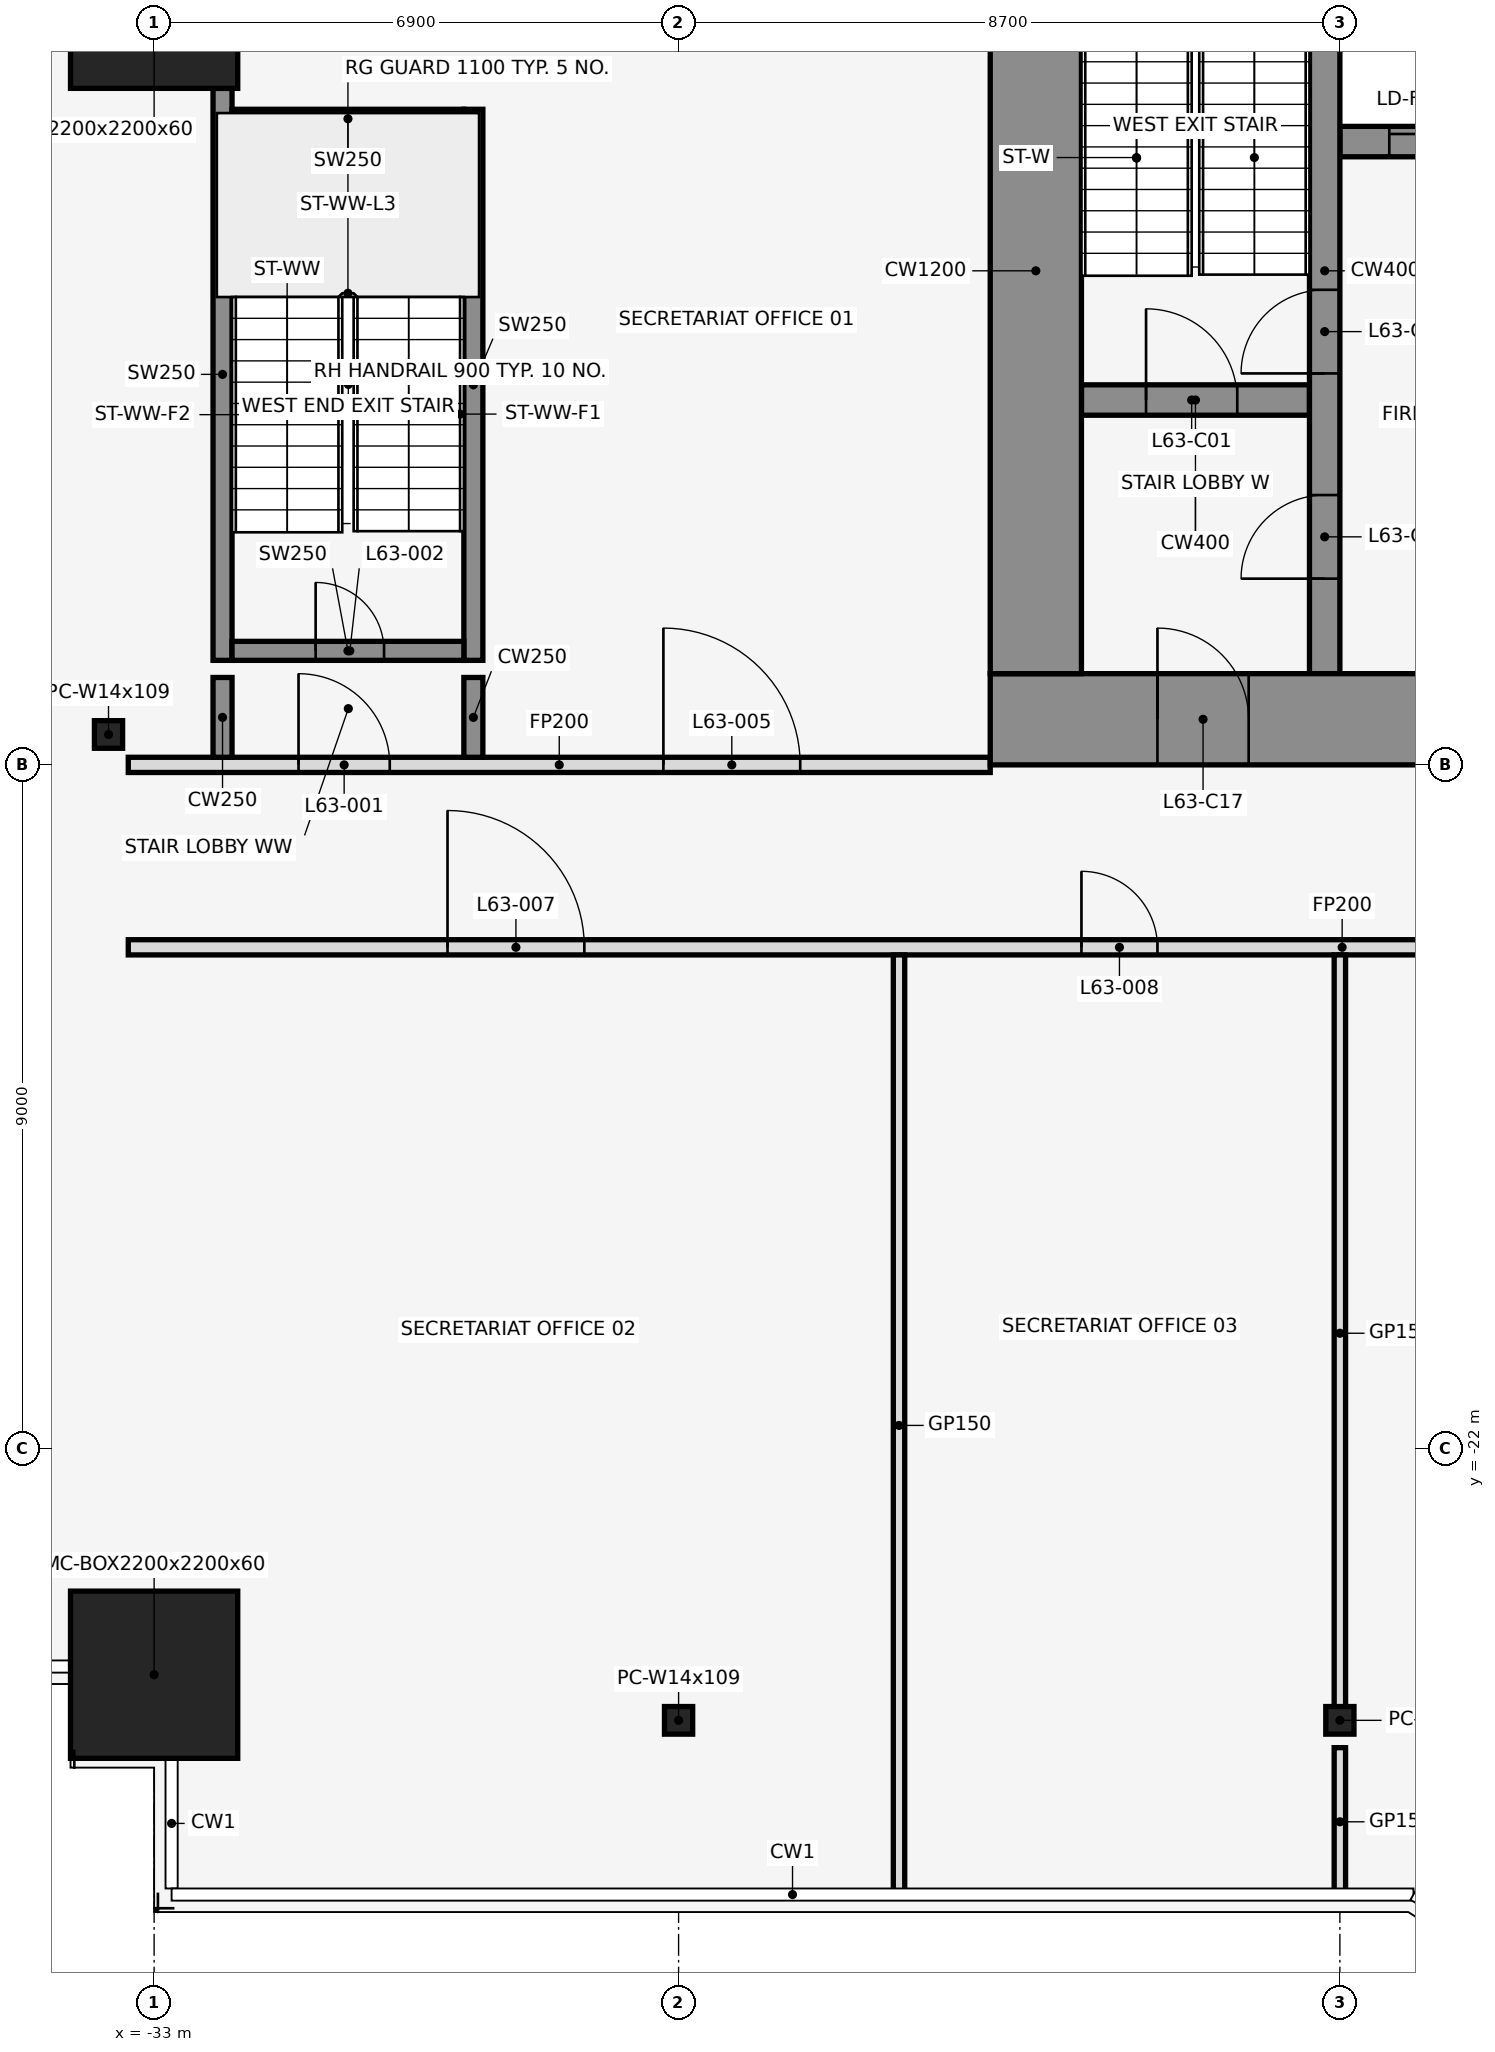
"""IFC4 building model, lengths in metres.
Left out: names, types, materials, properties, quantities, classifications, styles, units other than length and angle.
Written with IfcOpenShell. Run it as: python <this file> out.ifc"""

import sys

from ifc_helpers import new_model, si_unit, direction, frame, frame_2d, origin, origin_2d, place, context, subcontext, project, spatial, rectangle, hollow_rectangle, i_section, extrude, element, fill, save


model = new_model("IFC4")
c1 = context("Model", 3, precision=1e-05, world=origin(), true_north=direction((0.0, 1.0)))
c2 = subcontext(c1, "Body", "Model", "MODEL_VIEW")
j1 = project(units=[si_unit("LENGTHUNIT", "METRE"), si_unit("PLANEANGLEUNIT", "RADIAN")], contexts=[c1])
p1 = place(None, origin())
s1 = spatial("IfcSite", under=j1, at=p1, CompositionType="ELEMENT")
p2 = place(p1, origin())
s2 = spatial("IfcBuilding", under=s1, at=p2, CompositionType="ELEMENT")
p3 = place(p2, frame((0.0, 0.0, 279.2)))
s3 = spatial("IfcBuildingStorey", under=s2, at=p3, CompositionType="ELEMENT", Elevation=279.2)
for number, where, z_axis, x_axis in (
    (1, (-33.0, -24.97, 0.0), (0.0, 0.0, 1.0), (1.0, 0.0, 0.0)),
    (2, (-33.0, -3.0, 0.0), (0.0, 0.0, 1.0), (1.0, 0.0, 0.0)),
):
    element("IfcColumn", number, at=place(p3, frame(where, z_axis=z_axis, x_axis=x_axis)), inside=s3, PredefinedType="COLUMN", context=c2, shape_type="SweptSolid", body=[
        extrude(hollow_rectangle(XDim=2.2, YDim=2.2, WallThickness=0.06, at=origin_2d()), origin(), (0.0, 0.0, 1.0), 4.2),
    ])
for number, where, z_axis, x_axis in (
    (3, (-26.1, -25.57, 0.0), (0.0, 0.0, 1.0), (1.0, 0.0, 0.0)),
    (4, (-17.4, -25.57, 0.0), (0.0, 0.0, 1.0), (1.0, 0.0, 0.0)),
    (5, (-33.6, -12.6, 0.0), (0.0, 0.0, 1.0), (1.0, 0.0, 0.0)),
):
    element("IfcColumn", number, at=place(p3, frame(where, z_axis=z_axis, x_axis=x_axis)), inside=s3, PredefinedType="COLUMN", context=c2, shape_type="SweptSolid", body=[
        extrude(i_section(OverallWidth=0.371, OverallDepth=0.363, WebThickness=0.013, FlangeThickness=0.022, at=origin_2d()), origin(), (0.0, 0.0, 1.0), 4.2),
    ])
p4 = place(p3, frame((-32.1, -11.625, 0.0), z_axis=(0.0, 0.0, 1.0), x_axis=(0.0, 1.0, 0.0)))
e6 = element("IfcWall", 6, at=p4, inside=s3, PredefinedType="SHEAR", context=c2, shape_type="SweptSolid", body=[
    extrude(rectangle(XDim=7.525, YDim=0.25, at=frame_2d((3.762, 0.0))), origin(), (0.0, 0.0, 1.0), 4.2),
])
p5 = place(p3, frame((-28.8, -11.625, 0.0), z_axis=(0.0, 0.0, 1.0), x_axis=(0.0, 1.0, 0.0)))
e7 = element("IfcWall", 7, at=p5, inside=s3, PredefinedType="SHEAR", context=c2, shape_type="SweptSolid", body=[
    extrude(rectangle(XDim=7.25, YDim=0.25, at=frame_2d((3.625, 0.0))), origin(), (0.0, 0.0, 1.0), 4.2),
])
p6 = place(p3, frame((-31.975, -11.5, 0.0), z_axis=(0.0, 0.0, 1.0), x_axis=(1.0, 0.0, 0.0)))
e8 = element("IfcWall", 8, at=p6, inside=s3, PredefinedType="SHEAR", context=c2, shape_type="SweptSolid", body=[
    extrude(rectangle(XDim=3.05, YDim=0.25, at=frame_2d((1.525, 0.0))), origin(), (0.0, 0.0, 1.0), 4.2),
])
p7 = place(p6, frame((1.1, 0.0, 0.0)))
e9 = element("IfcOpeningElement", 9, at=p7, cuts=e8, PredefinedType="OPENING", context=c2, shape_type="SweptSolid", body=[
    extrude(rectangle(XDim=0.9, YDim=2.1, at=frame_2d((0.45, 1.05))), frame((0.0, 0.137, 0.0), z_axis=(0.0, -1.0, 0.0), x_axis=(1.0, 0.0, 0.0)), (0.0, 0.0, 1.0), 0.274),
])
p8 = place(p3, frame((-31.975, -4.5, 0.0), z_axis=(0.0, 0.0, 1.0), x_axis=(1.0, 0.0, 0.0)))
e10 = element("IfcWall", 10, at=p8, inside=s3, PredefinedType="SHEAR", context=c2, shape_type="SweptSolid", body=[
    extrude(rectangle(XDim=3.05, YDim=0.25, at=frame_2d((1.525, 0.0))), origin(), (0.0, 0.0, 1.0), 4.2),
])
p9 = place(p3, frame((-33.34, -15.4, 0.0), z_axis=(0.0, 0.0, 1.0), x_axis=(1.0, 0.0, 0.0)))
e11 = element("IfcWall", 11, at=p9, inside=s3, PredefinedType="PARTITIONING", context=c2, shape_type="SweptSolid", body=[
    extrude(rectangle(XDim=31.94, YDim=0.2, at=frame_2d((15.97, 0.0))), origin(), (0.0, 0.0, 1.0), 3.04),
])
p10 = place(p9, frame((4.2, 0.0, 0.0)))
e12 = element("IfcOpeningElement", 12, at=p10, cuts=e11, PredefinedType="OPENING", context=c2, shape_type="SweptSolid", body=[
    extrude(rectangle(XDim=1.8, YDim=2.1, at=frame_2d((0.9, 1.05))), frame((0.0, 0.112, 0.0), z_axis=(0.0, -1.0, 0.0), x_axis=(1.0, 0.0, 0.0)), (0.0, 0.0, 1.0), 0.224),
])
p11 = place(p9, frame((12.54, 0.0, 0.0)))
e13 = element("IfcOpeningElement", 13, at=p11, cuts=e11, PredefinedType="OPENING", context=c2, shape_type="SweptSolid", body=[
    extrude(rectangle(XDim=1.0, YDim=2.1, at=frame_2d((0.5, 1.05))), frame((0.0, 0.112, 0.0), z_axis=(0.0, -1.0, 0.0), x_axis=(1.0, 0.0, 0.0)), (0.0, 0.0, 1.0), 0.224),
])
p12 = place(p9, frame((20.84, 0.0, 0.0)))
e14 = element("IfcOpeningElement", 14, at=p12, cuts=e11, PredefinedType="OPENING", context=c2, shape_type="SweptSolid", body=[
    extrude(rectangle(XDim=1.8, YDim=2.1, at=frame_2d((0.9, 1.05))), frame((0.0, 0.112, 0.0), z_axis=(0.0, -1.0, 0.0), x_axis=(1.0, 0.0, 0.0)), (0.0, 0.0, 1.0), 0.224),
])
p13 = place(p3, frame((-33.34, -13.0, 0.0), z_axis=(0.0, 0.0, 1.0), x_axis=(1.0, 0.0, 0.0)))
e15 = element("IfcWall", 15, at=p13, inside=s3, PredefinedType="PARTITIONING", context=c2, shape_type="SweptSolid", body=[
    extrude(rectangle(XDim=11.34, YDim=0.2, at=frame_2d((5.67, 0.0))), origin(), (0.0, 0.0, 1.0), 3.04),
])
p14 = place(p13, frame((2.24, 0.0, 0.0)))
e16 = element("IfcOpeningElement", 16, at=p14, cuts=e15, PredefinedType="OPENING", context=c2, shape_type="SweptSolid", body=[
    extrude(rectangle(XDim=1.2, YDim=2.1, at=frame_2d((0.6, 1.05))), frame((0.0, 0.112, 0.0), z_axis=(0.0, -1.0, 0.0), x_axis=(1.0, 0.0, 0.0)), (0.0, 0.0, 1.0), 0.224),
])
p15 = place(p13, frame((7.04, 0.0, 0.0)))
e17 = element("IfcOpeningElement", 17, at=p15, cuts=e15, PredefinedType="OPENING", context=c2, shape_type="SweptSolid", body=[
    extrude(rectangle(XDim=1.8, YDim=2.1, at=frame_2d((0.9, 1.05))), frame((0.0, 0.112, 0.0), z_axis=(0.0, -1.0, 0.0), x_axis=(1.0, 0.0, 0.0)), (0.0, 0.0, 1.0), 0.224),
])
for number, where, z_axis, x_axis in (
    (18, (-32.1, -12.9, 0.0), (0.0, 0.0, 1.0), (0.0, 1.0, 0.0)),
    (19, (-28.8, -12.9, 0.0), (0.0, 0.0, 1.0), (0.0, 1.0, 0.0)),
):
    element("IfcWall", number, at=place(p3, frame(where, z_axis=z_axis, x_axis=x_axis)), inside=s3, PredefinedType="SHEAR", context=c2, shape_type="SweptSolid", body=[
        extrude(rectangle(XDim=1.05, YDim=0.25, at=frame_2d((0.525, 0.0))), origin(), (0.0, 0.0, 1.0), 4.2),
    ])
p16 = place(p3, frame((-23.2, -27.88, 0.0), z_axis=(0.0, 0.0, 1.0), x_axis=(0.0, 1.0, 0.0)))
e20 = element("IfcWall", 20, at=p16, inside=s3, PredefinedType="PARTITIONING", context=c2, shape_type="SweptSolid", body=[
    extrude(rectangle(XDim=12.38, YDim=0.15, at=frame_2d((6.19, 0.0))), origin(), (0.0, 0.0, 1.0), 3.04),
])
p17 = place(p3, frame((-17.4, -27.88, 0.0), z_axis=(0.0, 0.0, 1.0), x_axis=(0.0, 1.0, 0.0)))
e21 = element("IfcWall", 21, at=p17, inside=s3, PredefinedType="PARTITIONING", context=c2, shape_type="SweptSolid", body=[
    extrude(rectangle(XDim=1.951, YDim=0.15, at=frame_2d((0.975, 0.0))), origin(), (0.0, 0.0, 1.0), 3.04),
])
p18 = place(p3, frame((-17.4, -25.455, 0.0), z_axis=(0.0, 0.0, 1.0), x_axis=(0.0, 1.0, 0.0)))
e22 = element("IfcWall", 22, at=p18, inside=s3, PredefinedType="PARTITIONING", context=c2, shape_type="SweptSolid", body=[
    extrude(rectangle(XDim=9.955, YDim=0.15, at=frame_2d((4.977, 0.0))), origin(), (0.0, 0.0, 1.0), 3.04),
])
p19 = place(p3, frame((-20.8, -8.2, 0.0), z_axis=(0.0, 0.0, 1.0), x_axis=(1.0, 0.0, 0.0)))
e23 = element("IfcWall", 23, at=p19, inside=s3, PredefinedType="SHEAR", context=c2, shape_type="SweptSolid", body=[
    extrude(rectangle(XDim=3.0, YDim=0.4, at=frame_2d((1.5, 0.0))), origin(), (0.0, 0.0, 1.0), 4.2),
])
p20 = place(p19, frame((0.85, 0.0, 0.0)))
e24 = element("IfcOpeningElement", 24, at=p20, cuts=e23, PredefinedType="OPENING", context=c2, shape_type="SweptSolid", body=[
    extrude(rectangle(XDim=1.2, YDim=2.1, at=frame_2d((0.6, 1.05))), frame((0.0, 0.212, 0.0), z_axis=(0.0, -1.0, 0.0), x_axis=(1.0, 0.0, 0.0)), (0.0, 0.0, 1.0), 0.424),
])
p21 = place(p3, frame((-17.4, -4.8, 0.0), z_axis=(0.0, 0.0, 1.0), x_axis=(1.0, 0.0, 0.0)))
e25 = element("IfcWall", 25, at=p21, inside=s3, PredefinedType="SHEAR", context=c2, shape_type="SweptSolid", body=[
    extrude(rectangle(XDim=13.6, YDim=0.4, at=frame_2d((6.8, 0.0))), origin(), (0.0, 0.0, 1.0), 4.2),
])
p22 = place(p21, frame((0.65, 0.0, 0.0)))
e26 = element("IfcOpeningElement", 26, at=p22, cuts=e25, PredefinedType="OPENING", context=c2, shape_type="SweptSolid", body=[
    extrude(rectangle(XDim=1.1, YDim=2.1, at=frame_2d((0.55, 1.05))), frame((0.0, 0.212, 0.0), z_axis=(0.0, -1.0, 0.0), x_axis=(1.0, 0.0, 0.0)), (0.0, 0.0, 1.0), 0.424),
])
p23 = place(p21, frame((2.95, 0.0, 0.0)))
e27 = element("IfcOpeningElement", 27, at=p23, cuts=e25, PredefinedType="OPENING", context=c2, shape_type="SweptSolid", body=[
    extrude(rectangle(XDim=1.1, YDim=2.1, at=frame_2d((0.55, 1.05))), frame((0.0, 0.212, 0.0), z_axis=(0.0, -1.0, 0.0), x_axis=(1.0, 0.0, 0.0)), (0.0, 0.0, 1.0), 0.424),
])
p24 = place(p21, frame((8.75, 0.0, 0.0)))
e28 = element("IfcOpeningElement", 28, at=p24, cuts=e25, PredefinedType="OPENING", context=c2, shape_type="SweptSolid", body=[
    extrude(rectangle(XDim=0.9, YDim=2.1, at=frame_2d((0.45, 1.05))), frame((0.0, 0.212, 0.0), z_axis=(0.0, -1.0, 0.0), x_axis=(1.0, 0.0, 0.0)), (0.0, 0.0, 1.0), 0.424),
])
p25 = place(p3, frame((-17.6, -11.8, 0.0), z_axis=(0.0, 0.0, 1.0), x_axis=(0.0, 1.0, 0.0)))
e29 = element("IfcWall", 29, at=p25, inside=s3, PredefinedType="SHEAR", context=c2, shape_type="SweptSolid", body=[
    extrude(rectangle(XDim=10.6, YDim=0.4, at=frame_2d((5.3, 0.0))), origin(), (0.0, 0.0, 1.0), 4.2),
])
p26 = place(p25, frame((1.25, 0.0, 0.0)))
e30 = element("IfcOpeningElement", 30, at=p26, cuts=e29, PredefinedType="OPENING", context=c2, shape_type="SweptSolid", body=[
    extrude(rectangle(XDim=1.1, YDim=2.1, at=frame_2d((0.55, 1.05))), frame((0.0, 0.212, 0.0), z_axis=(0.0, -1.0, 0.0), x_axis=(1.0, 0.0, 0.0)), (0.0, 0.0, 1.0), 0.424),
])
p27 = place(p25, frame((3.95, 0.0, 0.0)))
e31 = element("IfcOpeningElement", 31, at=p27, cuts=e29, PredefinedType="OPENING", context=c2, shape_type="SweptSolid", body=[
    extrude(rectangle(XDim=1.1, YDim=2.1, at=frame_2d((0.55, 1.05))), frame((0.0, 0.212, 0.0), z_axis=(0.0, -1.0, 0.0), x_axis=(1.0, 0.0, 0.0)), (0.0, 0.0, 1.0), 0.424),
])
p28 = place(p3, frame((-22.0, -12.4, 0.0), z_axis=(0.0, 0.0, 1.0), x_axis=(1.0, 0.0, 0.0)))
e32 = element("IfcWall", 32, at=p28, inside=s3, PredefinedType="SHEAR", context=c2, shape_type="SweptSolid", body=[
    extrude(rectangle(XDim=44.0, YDim=1.2, at=frame_2d((22.0, 0.0))), origin(), (0.0, 0.0, 1.0), 4.2),
])
p29 = place(p28, frame((2.2, 0.0, 0.0)))
e33 = element("IfcOpeningElement", 33, at=p29, cuts=e32, PredefinedType="OPENING", context=c2, shape_type="SweptSolid", body=[
    extrude(rectangle(XDim=1.2, YDim=2.1, at=frame_2d((0.6, 1.05))), frame((0.0, 0.612, 0.0), z_axis=(0.0, -1.0, 0.0), x_axis=(1.0, 0.0, 0.0)), (0.0, 0.0, 1.0), 1.224),
])
p30 = place(p28, frame((21.4, 0.0, 0.0)))
e34 = element("IfcOpeningElement", 34, at=p30, cuts=e32, PredefinedType="OPENING", context=c2, shape_type="SweptSolid", body=[
    extrude(rectangle(XDim=1.2, YDim=2.1, at=frame_2d((0.6, 1.05))), frame((0.0, 0.612, 0.0), z_axis=(0.0, -1.0, 0.0), x_axis=(1.0, 0.0, 0.0)), (0.0, 0.0, 1.0), 1.224),
])
p31 = place(p28, frame((40.6, 0.0, 0.0)))
e35 = element("IfcOpeningElement", 35, at=p31, cuts=e32, PredefinedType="OPENING", context=c2, shape_type="SweptSolid", body=[
    extrude(rectangle(XDim=1.2, YDim=2.1, at=frame_2d((0.6, 1.05))), frame((0.0, 0.612, 0.0), z_axis=(0.0, -1.0, 0.0), x_axis=(1.0, 0.0, 0.0)), (0.0, 0.0, 1.0), 1.224),
])
p32 = place(p28, frame((16.0, 0.0, 0.0)))
e36 = element("IfcOpeningElement", 36, at=p32, cuts=e32, PredefinedType="OPENING", context=c2, shape_type="SweptSolid", body=[
    extrude(rectangle(XDim=1.8, YDim=2.1, at=frame_2d((0.9, 1.05))), frame((0.0, 0.612, 0.0), z_axis=(0.0, -1.0, 0.0), x_axis=(1.0, 0.0, 0.0)), (0.0, 0.0, 1.0), 1.224),
])
p33 = place(p28, frame((6.3, 0.0, 0.0)))
e37 = element("IfcOpeningElement", 37, at=p33, cuts=e32, PredefinedType="OPENING", context=c2, shape_type="SweptSolid", body=[
    extrude(rectangle(XDim=1.2, YDim=2.1, at=frame_2d((0.6, 1.05))), frame((0.0, 0.612, 0.0), z_axis=(0.0, -1.0, 0.0), x_axis=(1.0, 0.0, 0.0)), (0.0, 0.0, 1.0), 1.224),
])
p34 = place(p28, frame((26.2, 0.0, 0.0)))
e38 = element("IfcOpeningElement", 38, at=p34, cuts=e32, PredefinedType="OPENING", context=c2, shape_type="SweptSolid", body=[
    extrude(rectangle(XDim=1.8, YDim=2.1, at=frame_2d((0.9, 1.05))), frame((0.0, 0.612, 0.0), z_axis=(0.0, -1.0, 0.0), x_axis=(1.0, 0.0, 0.0)), (0.0, 0.0, 1.0), 1.224),
])
p35 = place(p28, frame((36.5, 0.0, 0.0)))
e39 = element("IfcOpeningElement", 39, at=p35, cuts=e32, PredefinedType="OPENING", context=c2, shape_type="SweptSolid", body=[
    extrude(rectangle(XDim=1.2, YDim=2.1, at=frame_2d((0.6, 1.05))), frame((0.0, 0.612, 0.0), z_axis=(0.0, -1.0, 0.0), x_axis=(1.0, 0.0, 0.0)), (0.0, 0.0, 1.0), 1.224),
])
p36 = place(p3, frame((-21.4, -11.8, 0.0), z_axis=(0.0, 0.0, 1.0), x_axis=(0.0, 1.0, 0.0)))
e40 = element("IfcWall", 40, at=p36, inside=s3, PredefinedType="SHEAR", context=c2, shape_type="SweptSolid", body=[
    extrude(rectangle(XDim=10.6, YDim=1.2, at=frame_2d((5.3, 0.0))), origin(), (0.0, 0.0, 1.0), 4.2),
])
p37 = place(p14, origin())
e41 = element("IfcDoor", 41, at=p37, inside=s3, OperationType="SINGLE_SWING_LEFT", PredefinedType="DOOR", context=c2, shape_type="SweptSolid", body=[
    extrude(rectangle(XDim=1.2, YDim=2.1, at=frame_2d((0.6, 1.05))), frame((0.0, 0.025, 0.0), z_axis=(0.0, -1.0, 0.0), x_axis=(1.0, 0.0, 0.0)), (0.0, 0.0, 1.0), 0.05),
])
fill(e16, e41)
p38 = place(p7, origin())
e42 = element("IfcDoor", 42, at=p38, inside=s3, OperationType="SINGLE_SWING_LEFT", PredefinedType="DOOR", context=c2, shape_type="SweptSolid", body=[
    extrude(rectangle(XDim=0.9, YDim=2.1, at=frame_2d((0.45, 1.05))), frame((0.0, 0.025, 0.0), z_axis=(0.0, -1.0, 0.0), x_axis=(1.0, 0.0, 0.0)), (0.0, 0.0, 1.0), 0.05),
])
fill(e9, e42)
p39 = place(p15, origin())
e43 = element("IfcDoor", 43, at=p39, inside=s3, OperationType="SINGLE_SWING_LEFT", PredefinedType="DOOR", context=c2, shape_type="SweptSolid", body=[
    extrude(rectangle(XDim=1.8, YDim=2.1, at=frame_2d((0.9, 1.05))), frame((0.0, 0.025, 0.0), z_axis=(0.0, -1.0, 0.0), x_axis=(1.0, 0.0, 0.0)), (0.0, 0.0, 1.0), 0.05),
])
fill(e17, e43)
p40 = place(p10, origin())
e44 = element("IfcDoor", 44, at=p40, inside=s3, OperationType="SINGLE_SWING_LEFT", PredefinedType="DOOR", context=c2, shape_type="SweptSolid", body=[
    extrude(rectangle(XDim=1.8, YDim=2.1, at=frame_2d((0.9, 1.05))), frame((0.0, 0.025, 0.0), z_axis=(0.0, -1.0, 0.0), x_axis=(1.0, 0.0, 0.0)), (0.0, 0.0, 1.0), 0.05),
])
fill(e12, e44)
p41 = place(p11, frame((1.0, 0.0, 0.0), z_axis=(0.0, 0.0, 1.0), x_axis=(-1.0, 0.0, 0.0)))
e45 = element("IfcDoor", 45, at=p41, inside=s3, OperationType="SINGLE_SWING_RIGHT", PredefinedType="DOOR", context=c2, shape_type="SweptSolid", body=[
    extrude(rectangle(XDim=1.0, YDim=2.1, at=frame_2d((0.5, 1.05))), frame((0.0, 0.025, 0.0), z_axis=(0.0, -1.0, 0.0), x_axis=(1.0, 0.0, 0.0)), (0.0, 0.0, 1.0), 0.05),
])
fill(e13, e45)
p42 = place(p20, origin())
e46 = element("IfcDoor", 46, at=p42, inside=s3, OperationType="SINGLE_SWING_LEFT", PredefinedType="DOOR", context=c2, shape_type="SweptSolid", body=[
    extrude(rectangle(XDim=1.2, YDim=2.1, at=frame_2d((0.6, 1.05))), frame((0.0, 0.025, 0.0), z_axis=(0.0, -1.0, 0.0), x_axis=(1.0, 0.0, 0.0)), (0.0, 0.0, 1.0), 0.05),
])
fill(e24, e46)
p43 = place(p26, frame((1.1, 0.0, 0.0), z_axis=(0.0, 0.0, 1.0), x_axis=(-1.0, 0.0, 0.0)))
e47 = element("IfcDoor", 47, at=p43, inside=s3, OperationType="SINGLE_SWING_LEFT", PredefinedType="DOOR", context=c2, shape_type="SweptSolid", body=[
    extrude(rectangle(XDim=1.1, YDim=2.1, at=frame_2d((0.55, 1.05))), frame((0.0, 0.025, 0.0), z_axis=(0.0, -1.0, 0.0), x_axis=(1.0, 0.0, 0.0)), (0.0, 0.0, 1.0), 0.05),
])
fill(e30, e47)
p44 = place(p22, origin())
e48 = element("IfcDoor", 48, at=p44, inside=s3, OperationType="DOUBLE_DOOR_SLIDING", PredefinedType="DOOR", context=c2, shape_type="SweptSolid", body=[
    extrude(rectangle(XDim=1.1, YDim=2.1, at=frame_2d((0.55, 1.05))), frame((0.0, 0.025, 0.0), z_axis=(0.0, -1.0, 0.0), x_axis=(1.0, 0.0, 0.0)), (0.0, 0.0, 1.0), 0.05),
])
fill(e26, e48)
p45 = place(p27, frame((1.1, 0.0, 0.0), z_axis=(0.0, 0.0, 1.0), x_axis=(-1.0, 0.0, 0.0)))
e49 = element("IfcDoor", 49, at=p45, inside=s3, OperationType="SINGLE_SWING_LEFT", PredefinedType="DOOR", context=c2, shape_type="SweptSolid", body=[
    extrude(rectangle(XDim=1.1, YDim=2.1, at=frame_2d((0.55, 1.05))), frame((0.0, 0.025, 0.0), z_axis=(0.0, -1.0, 0.0), x_axis=(1.0, 0.0, 0.0)), (0.0, 0.0, 1.0), 0.05),
])
fill(e31, e49)
p46 = place(p29, frame((1.2, 0.0, 0.0), z_axis=(0.0, 0.0, 1.0), x_axis=(-1.0, 0.0, 0.0)))
e50 = element("IfcDoor", 50, at=p46, inside=s3, OperationType="SINGLE_SWING_RIGHT", PredefinedType="DOOR", context=c2, shape_type="SweptSolid", body=[
    extrude(rectangle(XDim=1.2, YDim=2.1, at=frame_2d((0.6, 1.05))), frame((0.0, 0.025, 0.0), z_axis=(0.0, -1.0, 0.0), x_axis=(1.0, 0.0, 0.0)), (0.0, 0.0, 1.0), 0.05),
])
fill(e33, e50)
save(model, sys.argv[1])
